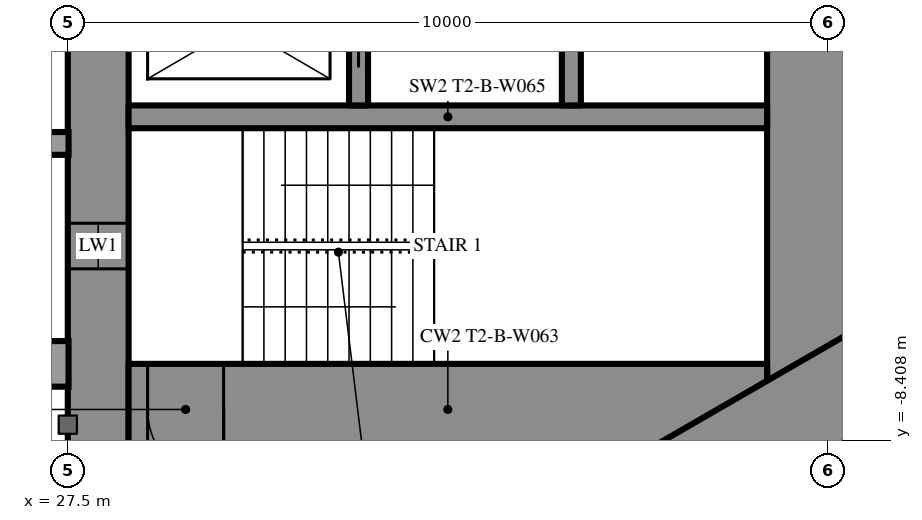
"""IFC4 building model, lengths in metres.
Left out: names, types, materials, properties, quantities, classifications, styles, units other than length and angle.
Written with IfcOpenShell. Run it as: python <this file> out.ifc"""

import sys

from ifc_helpers import new_model, si_unit, direction, frame, frame_2d, origin, place, context, subcontext, project, spatial, rectangle, extrude, element, fill, save


model = new_model("IFC4")
c1 = context("Model", 3, precision=1e-05, world=origin(), true_north=direction((0.0, 1.0)))
c2 = subcontext(c1, "Body", "Model", "MODEL_VIEW")
j1 = project(units=[si_unit("LENGTHUNIT", "METRE"), si_unit("PLANEANGLEUNIT", "RADIAN")], contexts=[c1])
p1 = place(None, origin())
s1 = spatial("IfcSite", under=j1, at=p1, CompositionType="ELEMENT")
p2 = place(p1, origin())
s2 = spatial("IfcBuilding", under=s1, at=p2, CompositionType="ELEMENT")
p3 = place(p2, frame((0.0, 0.0, 136.1)))
s3 = spatial("IfcBuildingStorey", under=s2, at=p3, CompositionType="ELEMENT", Elevation=136.1)
p4 = place(p3, frame((27.9, -8.6, 0.0), z_axis=(0.0, 0.0, 1.0), x_axis=(0.0, 1.0, 0.0)))
e1 = element("IfcWall", 1, at=p4, inside=s3, PredefinedType="SHEAR", context=c2, shape_type="SweptSolid", body=[
    extrude(rectangle(XDim=17.2, YDim=0.8, at=frame_2d((8.6, 0.0))), origin(), (0.0, 0.0, 1.0), 3.5),
])
p5 = place(p4, frame((2.45, 0.0, 0.6)))
e2 = element("IfcOpeningElement", 2, at=p5, cuts=e1, PredefinedType="OPENING", context=c2, shape_type="SweptSolid", body=[
    extrude(rectangle(XDim=0.6, YDim=2.1, at=frame_2d((0.3, 1.05))), frame((0.0, 0.41, 0.0), z_axis=(0.0, -1.0, 0.0), x_axis=(1.0, 0.0, 0.0)), (0.0, 0.0, 1.0), 0.82),
])
p6 = place(p4, frame((14.15, 0.0, 0.6)))
e3 = element("IfcOpeningElement", 3, at=p6, cuts=e1, PredefinedType="OPENING", context=c2, shape_type="SweptSolid", body=[
    extrude(rectangle(XDim=0.6, YDim=2.1, at=frame_2d((0.3, 1.05))), frame((0.0, 0.41, 0.0), z_axis=(0.0, -1.0, 0.0), x_axis=(1.0, 0.0, 0.0)), (0.0, 0.0, 1.0), 0.82),
])
p7 = place(p3, frame((37.3, -8.6, 0.0), z_axis=(0.0, 0.0, 1.0), x_axis=(0.0, 1.0, 0.0)))
e4 = element("IfcWall", 4, at=p7, inside=s3, PredefinedType="SHEAR", context=c2, shape_type="SweptSolid", body=[
    extrude(rectangle(XDim=17.2, YDim=1.2, at=frame_2d((8.6, 0.0))), origin(), (0.0, 0.0, 1.0), 3.5),
])
p8 = place(p7, frame((7.7, 0.0, 0.0)))
e5 = element("IfcOpeningElement", 5, at=p8, cuts=e4, PredefinedType="OPENING", context=c2, shape_type="SweptSolid", body=[
    extrude(rectangle(XDim=1.8, YDim=2.2, at=frame_2d((0.9, 1.1))), frame((0.0, 0.61, 0.0), z_axis=(0.0, -1.0, 0.0), x_axis=(1.0, 0.0, 0.0)), (0.0, 0.0, 1.0), 1.22),
])
p9 = place(p3, frame((28.3, -8.0, 0.0), z_axis=(0.0, 0.0, 1.0), x_axis=(1.0, 0.0, 0.0)))
e6 = element("IfcWall", 6, at=p9, inside=s3, PredefinedType="SHEAR", context=c2, shape_type="SweptSolid", body=[
    extrude(rectangle(XDim=8.4, YDim=1.2, at=frame_2d((4.2, 0.0))), origin(), (0.0, 0.0, 1.0), 3.5),
])
p10 = place(p9, frame((0.25, 0.0, 0.0)))
e7 = element("IfcOpeningElement", 7, at=p10, cuts=e6, PredefinedType="OPENING", context=c2, shape_type="SweptSolid", body=[
    extrude(rectangle(XDim=1.0, YDim=2.2, at=frame_2d((0.5, 1.1))), frame((0.0, 0.61, 0.0), z_axis=(0.0, -1.0, 0.0), x_axis=(1.0, 0.0, 0.0)), (0.0, 0.0, 1.0), 1.22),
])
p11 = place(p3, frame((28.3, -4.15, 0.0), z_axis=(0.0, 0.0, 1.0), x_axis=(1.0, 0.0, 0.0)))
e8 = element("IfcWall", 8, at=p11, inside=s3, PredefinedType="SHEAR", context=c2, shape_type="SweptSolid", body=[
    extrude(rectangle(XDim=8.4, YDim=0.3, at=frame_2d((4.2, 0.0))), origin(), (0.0, 0.0, 1.0), 3.5),
])
p12 = place(p3, frame((31.325, -4.0, 0.0), z_axis=(0.0, 0.0, 1.0), x_axis=(0.0, 1.0, 0.0)))
e9 = element("IfcWall", 9, at=p12, inside=s3, PredefinedType="SHEAR", context=c2, shape_type="SweptSolid", body=[
    extrude(rectangle(XDim=2.1, YDim=0.25, at=frame_2d((1.05, 0.0))), origin(), (0.0, 0.0, 1.0), 3.5),
])
p13 = place(p12, frame((0.5, 0.0, 0.0)))
e10 = element("IfcOpeningElement", 10, at=p13, cuts=e9, PredefinedType="OPENING", context=c2, shape_type="SweptSolid", body=[
    extrude(rectangle(XDim=1.1, YDim=2.2, at=frame_2d((0.55, 1.1))), frame((0.0, 0.135, 0.0), z_axis=(0.0, -1.0, 0.0), x_axis=(1.0, 0.0, 0.0)), (0.0, 0.0, 1.0), 0.27),
])
p14 = place(p3, frame((34.125, -4.0, 0.0), z_axis=(0.0, 0.0, 1.0), x_axis=(0.0, 1.0, 0.0)))
e11 = element("IfcWall", 11, at=p14, inside=s3, PredefinedType="SHEAR", context=c2, shape_type="SweptSolid", body=[
    extrude(rectangle(XDim=2.35, YDim=0.25, at=frame_2d((1.175, 0.0))), origin(), (0.0, 0.0, 1.0), 3.5),
])
p15 = place(p3, frame((27.2, -13.8, 0.0), z_axis=(0.0, 0.0, 1.0), x_axis=(0.866027159892, 0.499996958321, 0.0)))
e12 = element("IfcWall", 12, at=p15, inside=s3, PredefinedType="SHEAR", context=c2, shape_type="SweptSolid", body=[
    extrude(rectangle(XDim=27.947, YDim=1.2, at=frame_2d((13.973, 0.0))), origin(), (0.0, 0.0, 1.0), 3.5),
])
p16 = place(p15, frame((4.6, 0.0, 0.0)))
e13 = element("IfcOpeningElement", 13, at=p16, cuts=e12, PredefinedType="OPENING", context=c2, shape_type="SweptSolid", body=[
    extrude(rectangle(XDim=1.0, YDim=2.2, at=frame_2d((0.5, 1.1))), frame((0.0, 0.61, 0.0), z_axis=(0.0, -1.0, 0.0), x_axis=(1.0, 0.0, 0.0)), (0.0, 0.0, 1.0), 1.22),
])
p17 = place(p15, frame((13.395, 0.0, 0.0)))
e14 = element("IfcOpeningElement", 14, at=p17, cuts=e12, PredefinedType="OPENING", context=c2, shape_type="SweptSolid", body=[
    extrude(rectangle(XDim=1.8, YDim=2.2, at=frame_2d((0.9, 1.1))), frame((0.0, 0.61, 0.0), z_axis=(0.0, -1.0, 0.0), x_axis=(1.0, 0.0, 0.0)), (0.0, 0.0, 1.0), 1.22),
])
p18 = place(p10, origin())
e15 = element("IfcDoor", 15, at=p18, inside=s3, OperationType="SINGLE_SWING_RIGHT", PredefinedType="DOOR", context=c2, shape_type="SweptSolid", body=[
    extrude(rectangle(XDim=1.0, YDim=2.2, at=frame_2d((0.5, 1.1))), frame((0.0, 0.025, 0.0), z_axis=(0.0, -1.0, 0.0), x_axis=(1.0, 0.0, 0.0)), (0.0, 0.0, 1.0), 0.05),
])
fill(e7, e15)
p19 = place(p13, origin())
e16 = element("IfcDoor", 16, at=p19, inside=s3, OperationType="SLIDING_TO_LEFT", PredefinedType="USERDEFINED", context=c2, shape_type="SweptSolid", body=[
    extrude(rectangle(XDim=1.1, YDim=2.2, at=frame_2d((0.55, 1.1))), frame((0.0, 0.025, 0.0), z_axis=(0.0, -1.0, 0.0), x_axis=(1.0, 0.0, 0.0)), (0.0, 0.0, 1.0), 0.05),
])
fill(e10, e16)
p20 = place(p5, origin())
e17 = element("IfcWindow", 17, at=p20, inside=s3, PartitioningType="SINGLE_PANEL", PredefinedType="WINDOW", context=c2, shape_type="SweptSolid", body=[
    extrude(rectangle(XDim=0.6, YDim=2.1, at=frame_2d((0.3, 1.05))), frame((0.0, 0.03, 0.0), z_axis=(0.0, -1.0, 0.0), x_axis=(1.0, 0.0, 0.0)), (0.0, 0.0, 1.0), 0.06),
])
fill(e2, e17)
save(model, sys.argv[1])
